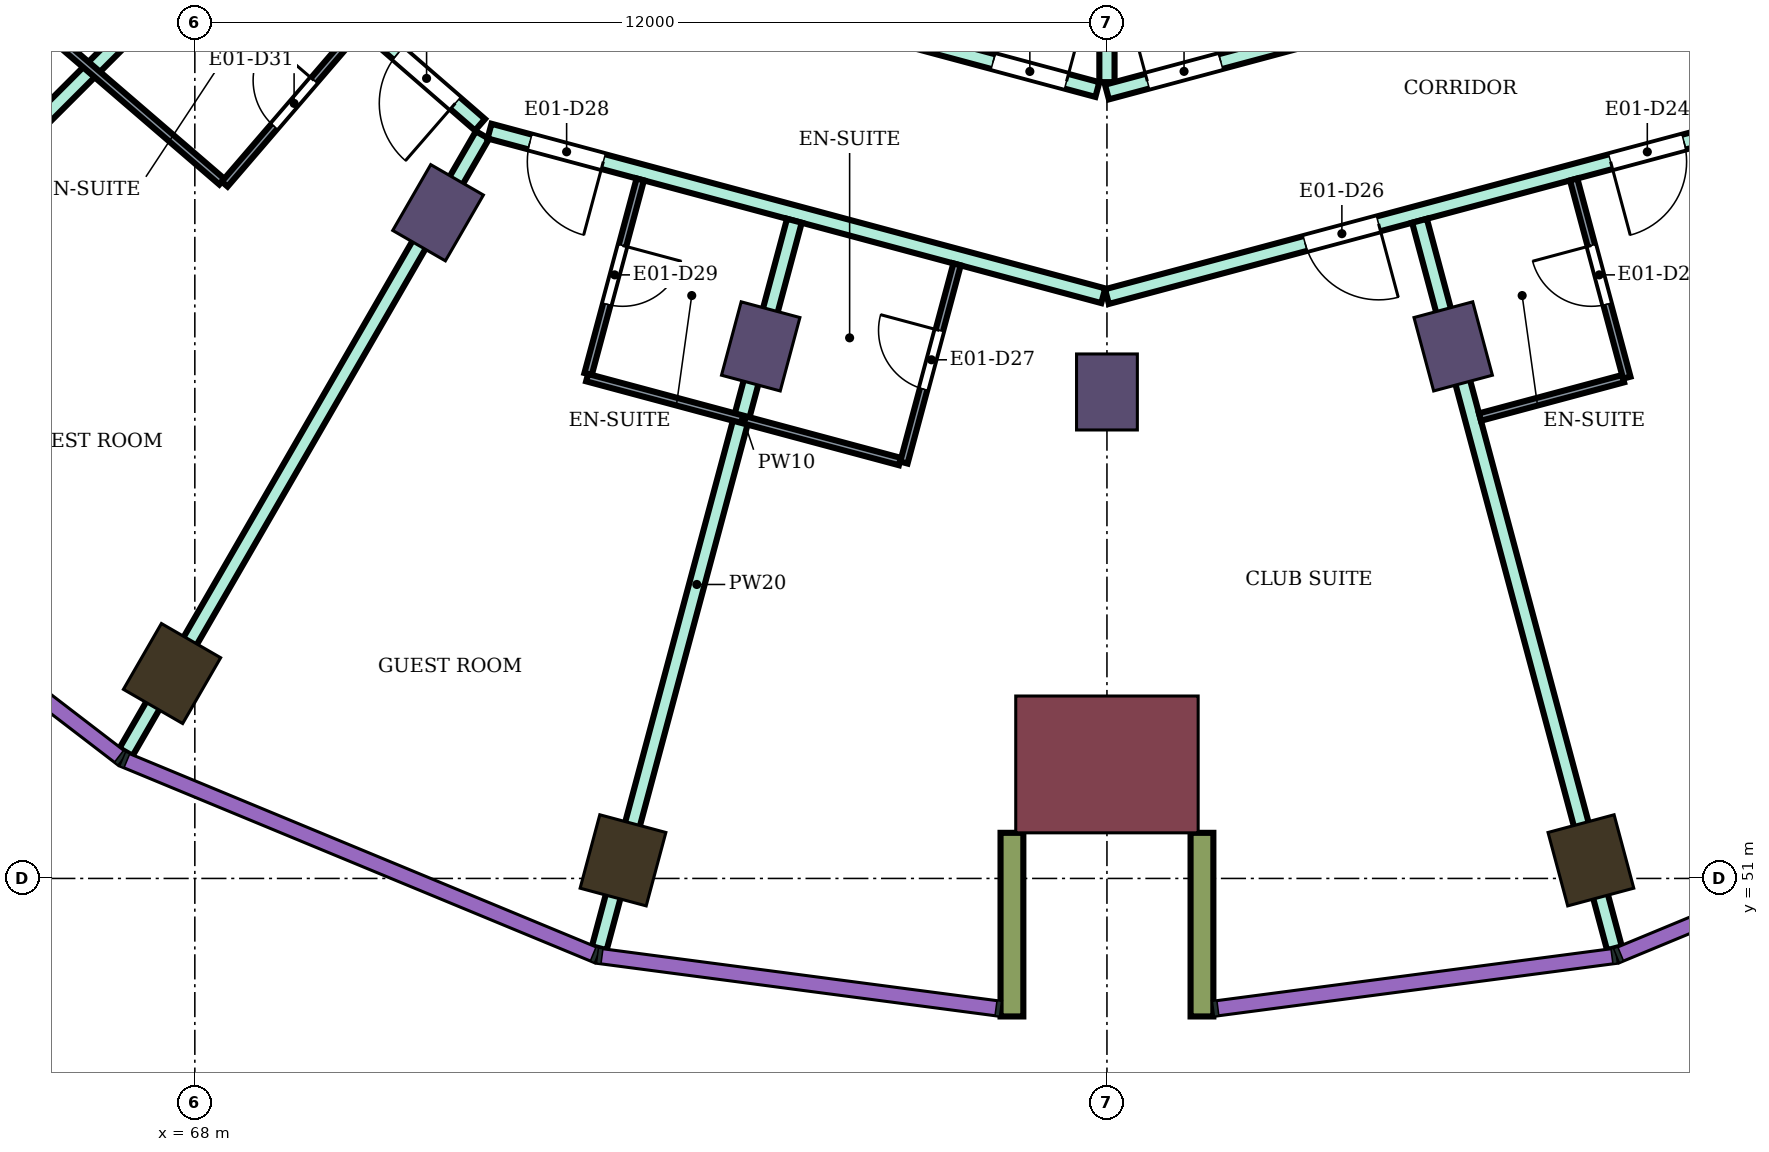
"""IFC4 building model, lengths in metres.
Left out: names, types, materials, properties, quantities, classifications, styles, units other than length and angle.
Written with IfcOpenShell. Run it as: python <this file> out.ifc"""

import sys

from ifc_helpers import new_model, si_unit, direction, frame, frame_2d, origin, origin_2d, place, context, subcontext, project, spatial, rectangle, extrude, element, fill, save


model = new_model("IFC4")
c1 = context("Model", 3, precision=1e-05, world=origin(), true_north=direction((0.0, 1.0)))
c2 = subcontext(c1, "Body", "Model", "MODEL_VIEW")
j1 = project(units=[si_unit("LENGTHUNIT", "METRE"), si_unit("PLANEANGLEUNIT", "RADIAN")], contexts=[c1])
p1 = place(None, origin())
s1 = spatial("IfcSite", under=j1, at=p1, CompositionType="ELEMENT")
p2 = place(p1, origin())
s2 = spatial("IfcBuilding", under=s1, at=p2, CompositionType="ELEMENT")
p3 = place(p2, frame((0.0, 0.0, 118.5)))
s3 = spatial("IfcBuildingStorey", under=s2, at=p3, CompositionType="ELEMENT", Elevation=118.5)
for number, where, z_axis, x_axis in (
    (1, (67.7, 53.696, 0.0), (0.0, 0.0, 1.0), (-0.5, -0.866, 0.0)),
    (2, (73.633, 51.238, 0.0), (0.0, 0.0, 1.0), (-0.259, -0.966, 0.0)),
    (3, (86.367, 51.238, 0.0), (0.0, 0.0, 1.0), (0.259, -0.966, 0.0)),
):
    element("IfcColumn", number, at=place(p3, frame(where, z_axis=z_axis, x_axis=x_axis)), inside=s3, PredefinedType="COLUMN", context=c2, shape_type="SweptSolid", body=[
        extrude(rectangle(XDim=1.0, YDim=0.9, at=origin_2d()), origin(), (0.0, 0.0, 1.0), 3.9),
    ])
for number, where, z_axis, x_axis in (
    (4, (71.2, 59.758, 0.0), (0.0, 0.0, 1.0), (-0.5, -0.866, 0.0)),
    (5, (75.445, 58.0, 0.0), (0.0, 0.0, 1.0), (-0.259, -0.966, 0.0)),
    (6, (80.0, 57.4, 0.0), (0.0, 0.0, 1.0), (0.0, -1.0, 0.0)),
    (7, (84.555, 58.0, 0.0), (0.0, 0.0, 1.0), (0.259, -0.966, 0.0)),
):
    element("IfcColumn", number, at=place(p3, frame(where, z_axis=z_axis, x_axis=x_axis)), inside=s3, PredefinedType="COLUMN", context=c2, shape_type="SweptSolid", body=[
        extrude(rectangle(XDim=1.0, YDim=0.8, at=origin_2d()), origin(), (0.0, 0.0, 1.0), 3.9),
    ])
p4 = place(p3, frame((80.0, 52.5, 0.0), z_axis=(0.0, 0.0, 1.0), x_axis=(0.0, -1.0, 0.0)))
e8 = element("IfcColumn", 8, at=p4, inside=s3, PredefinedType="COLUMN", context=c2, shape_type="SweptSolid", body=[
    extrude(rectangle(XDim=1.8, YDim=2.4, at=origin_2d()), origin(), (0.0, 0.0, 1.0), 3.9),
])
for number, where, z_axis, x_axis in (
    (9, (78.75, 51.6, 0.0), (0.0, 0.0, 1.0), (0.0, -1.0, 0.0)),
    (10, (81.25, 51.6, 0.0), (0.0, 0.0, 1.0), (0.0, -1.0, 0.0)),
):
    element("IfcWall", number, at=place(p3, frame(where, z_axis=z_axis, x_axis=x_axis)), inside=s3, PredefinedType="NOTDEFINED", context=c2, shape_type="SweptSolid", body=[
        extrude(rectangle(XDim=2.416, YDim=0.3, at=frame_2d((1.208, 0.0))), origin(), (0.0, 0.0, 1.0), 3.9),
    ])
p5 = place(p3, frame((63.596, 58.596, 0.0), z_axis=(0.0, 0.0, 1.0), x_axis=(0.707106781187, 0.707106781187, 0.0)))
e11 = element("IfcWall", 11, at=p5, inside=s3, PredefinedType="PARTITIONING", context=c2, shape_type="SweptSolid", body=[
    extrude(rectangle(XDim=7.005, YDim=0.2, at=frame_2d((3.503, 0.0))), origin(), (0.0, 0.0, 1.0), 3.45),
])
p6 = place(p3, frame((67.081, 64.971, 0.0), z_axis=(0.0, 0.0, 1.0), x_axis=(0.755031061605, -0.65568902386, 0.0)))
e12 = element("IfcWall", 12, at=p6, inside=s3, PredefinedType="PARTITIONING", context=c2, shape_type="SweptSolid", body=[
    extrude(rectangle(XDim=6.186, YDim=0.2, at=frame_2d((3.093, 0.0))), origin(), (0.0, 0.0, 1.0), 3.45),
])
p7 = place(p6, frame((4.755, 0.0, 0.0)))
e13 = element("IfcOpeningElement", 13, at=p7, cuts=e12, PredefinedType="OPENING", context=c2, shape_type="SweptSolid", body=[
    extrude(rectangle(XDim=1.0, YDim=2.1, at=frame_2d((0.5, 1.05))), frame((0.0, 0.11, 0.0), z_axis=(0.0, -1.0, 0.0), x_axis=(1.0, 0.0, 0.0)), (0.0, 0.0, 1.0), 0.22),
])
p8 = place(p3, frame((67.094, 52.663, 0.0), z_axis=(0.0, 0.0, 1.0), x_axis=(0.500228134253, 0.865893650342, 0.0)))
e14 = element("IfcWall", 14, at=p8, inside=s3, PredefinedType="PARTITIONING", context=c2, shape_type="SweptSolid", body=[
    extrude(rectangle(XDim=9.375, YDim=0.2, at=frame_2d((4.687, 0.0))), origin(), (0.0, 0.0, 1.0), 3.45),
])
p9 = place(p3, frame((71.877, 60.832, 0.0), z_axis=(0.0, 0.0, 1.0), x_axis=(0.965857276008, -0.259074742848, 0.0)))
e15 = element("IfcWall", 15, at=p9, inside=s3, PredefinedType="PARTITIONING", context=c2, shape_type="SweptSolid", body=[
    extrude(rectangle(XDim=8.36, YDim=0.2, at=frame_2d((4.18, 0.0))), origin(), (0.0, 0.0, 1.0), 3.45),
])
p10 = place(p9, frame((0.55, 0.0, 0.0)))
e16 = element("IfcOpeningElement", 16, at=p10, cuts=e15, PredefinedType="OPENING", context=c2, shape_type="SweptSolid", body=[
    extrude(rectangle(XDim=1.0, YDim=2.1, at=frame_2d((0.5, 1.05))), frame((0.0, 0.11, 0.0), z_axis=(0.0, -1.0, 0.0), x_axis=(1.0, 0.0, 0.0)), (0.0, 0.0, 1.0), 0.22),
])
p11 = place(p3, frame((73.297, 63.143, 0.0), z_axis=(0.0, 0.0, 1.0), x_axis=(0.965859030528, -0.25906820173, 0.0)))
e17 = element("IfcWall", 17, at=p11, inside=s3, PredefinedType="PARTITIONING", context=c2, shape_type="SweptSolid", body=[
    extrude(rectangle(XDim=6.81, YDim=0.2, at=frame_2d((3.405, 0.0))), origin(), (0.0, 0.0, 1.0), 3.45),
])
p12 = place(p11, frame((5.39, 0.0, 0.0)))
e18 = element("IfcOpeningElement", 18, at=p12, cuts=e17, PredefinedType="OPENING", context=c2, shape_type="SweptSolid", body=[
    extrude(rectangle(XDim=1.0, YDim=2.1, at=frame_2d((0.5, 1.05))), frame((0.0, 0.11, 0.0), z_axis=(0.0, -1.0, 0.0), x_axis=(1.0, 0.0, 0.0)), (0.0, 0.0, 1.0), 0.22),
])
p13 = place(p3, frame((73.321, 50.082, 0.0), z_axis=(0.0, 0.0, 1.0), x_axis=(0.259057928998, 0.96586178588, 0.0)))
e19 = element("IfcWall", 19, at=p13, inside=s3, PredefinedType="PARTITIONING", context=c2, shape_type="SweptSolid", body=[
    extrude(rectangle(XDim=9.909, YDim=0.2, at=frame_2d((4.954, 0.0))), origin(), (0.0, 0.0, 1.0), 3.45),
])
p14 = place(p3, frame((80.0, 58.655, 0.0), z_axis=(0.0, 0.0, 1.0), x_axis=(0.965967338894, 0.258664068224, 0.0)))
e20 = element("IfcWall", 20, at=p14, inside=s3, PredefinedType="PARTITIONING", context=c2, shape_type="SweptSolid", body=[
    extrude(rectangle(XDim=8.36, YDim=0.2, at=frame_2d((4.18, 0.0))), origin(), (0.0, 0.0, 1.0), 3.45),
])
p15 = place(p14, frame((6.86, 0.0, 0.0)))
e21 = element("IfcOpeningElement", 21, at=p15, cuts=e20, PredefinedType="OPENING", context=c2, shape_type="SweptSolid", body=[
    extrude(rectangle(XDim=1.0, YDim=2.1, at=frame_2d((0.5, 1.05))), frame((0.0, 0.11, 0.0), z_axis=(0.0, -1.0, 0.0), x_axis=(1.0, 0.0, 0.0)), (0.0, 0.0, 1.0), 0.22),
])
p16 = place(p14, frame((2.7, 0.0, 0.0)))
e22 = element("IfcOpeningElement", 22, at=p16, cuts=e20, PredefinedType="OPENING", context=c2, shape_type="SweptSolid", body=[
    extrude(rectangle(XDim=1.0, YDim=2.1, at=frame_2d((0.5, 1.05))), frame((0.0, 0.11, 0.0), z_axis=(0.0, -1.0, 0.0), x_axis=(1.0, 0.0, 0.0)), (0.0, 0.0, 1.0), 0.22),
])
p17 = place(p3, frame((80.0, 61.476, 0.0), z_axis=(0.0, 0.0, 1.0), x_axis=(0.0, 1.0, 0.0)))
e23 = element("IfcWall", 23, at=p17, inside=s3, PredefinedType="PARTITIONING", context=c2, shape_type="SweptSolid", body=[
    extrude(rectangle(XDim=5.825, YDim=0.2, at=frame_2d((2.913, 0.0))), origin(), (0.0, 0.0, 1.0), 3.45),
])
p18 = place(p3, frame((80.0, 61.346, 0.0), z_axis=(0.0, 0.0, 1.0), x_axis=(0.965924181808, 0.258825182312, 0.0)))
e24 = element("IfcWall", 24, at=p18, inside=s3, PredefinedType="PARTITIONING", context=c2, shape_type="SweptSolid", body=[
    extrude(rectangle(XDim=6.94, YDim=0.2, at=frame_2d((3.47, 0.0))), origin(), (0.0, 0.0, 1.0), 3.45),
])
p19 = place(p18, frame((0.55, 0.0, 0.0)))
e25 = element("IfcOpeningElement", 25, at=p19, cuts=e24, PredefinedType="OPENING", context=c2, shape_type="SweptSolid", body=[
    extrude(rectangle(XDim=1.0, YDim=2.1, at=frame_2d((0.5, 1.05))), frame((0.0, 0.11, 0.0), z_axis=(0.0, -1.0, 0.0), x_axis=(1.0, 0.0, 0.0)), (0.0, 0.0, 1.0), 0.22),
])
p20 = place(p3, frame((84.112, 59.652, 0.0), z_axis=(0.0, 0.0, 1.0), x_axis=(0.258838718107, -0.965920554709, 0.0)))
e26 = element("IfcWall", 26, at=p20, inside=s3, PredefinedType="PARTITIONING", context=c2, shape_type="SweptSolid", body=[
    extrude(rectangle(XDim=9.908, YDim=0.2, at=frame_2d((4.954, 0.0))), origin(), (0.0, 0.0, 1.0), 3.45),
])
p21 = place(p3, frame((65.209, 62.875, 0.0), z_axis=(0.0, 0.0, 1.0), x_axis=(0.757930378138, -0.652335451969, 0.0)))
e27 = element("IfcWall", 27, at=p21, inside=s3, PredefinedType="PARTITIONING", context=c2, shape_type="SweptSolid", body=[
    extrude(rectangle(XDim=4.15, YDim=0.1, at=frame_2d((2.075, 0.0))), origin(), (0.0, 0.0, 1.0), 3.45),
])
p22 = place(p3, frame((68.393, 60.135, 0.0), z_axis=(0.0, 0.0, 1.0), x_axis=(0.652061182569, 0.758166349944, 0.0)))
e28 = element("IfcWall", 28, at=p22, inside=s3, PredefinedType="PARTITIONING", context=c2, shape_type="SweptSolid", body=[
    extrude(rectangle(XDim=2.69, YDim=0.1, at=frame_2d((1.345, 0.0))), origin(), (0.0, 0.0, 1.0), 3.45),
])
p23 = place(p22, frame((1.0, 0.0, 0.0)))
e29 = element("IfcOpeningElement", 29, at=p23, cuts=e28, PredefinedType="OPENING", context=c2, shape_type="SweptSolid", body=[
    extrude(rectangle(XDim=0.8, YDim=2.1, at=frame_2d((0.4, 1.05))), frame((0.0, 0.06, 0.0), z_axis=(0.0, -1.0, 0.0), x_axis=(1.0, 0.0, 0.0)), (0.0, 0.0, 1.0), 0.12),
])
p24 = place(p3, frame((73.174, 57.636, 0.0), z_axis=(0.0, 0.0, 1.0), x_axis=(0.258952498977, 0.96589005755, 0.0)))
e30 = element("IfcWall", 30, at=p24, inside=s3, PredefinedType="PARTITIONING", context=c2, shape_type="SweptSolid", body=[
    extrude(rectangle(XDim=2.65, YDim=0.1, at=frame_2d((1.325, 0.0))), origin(), (0.0, 0.0, 1.0), 3.45),
])
p25 = place(p24, frame((0.95, 0.0, 0.0)))
e31 = element("IfcOpeningElement", 31, at=p25, cuts=e30, PredefinedType="OPENING", context=c2, shape_type="SweptSolid", body=[
    extrude(rectangle(XDim=0.8, YDim=2.1, at=frame_2d((0.4, 1.05))), frame((0.0, 0.06, 0.0), z_axis=(0.0, -1.0, 0.0), x_axis=(1.0, 0.0, 0.0)), (0.0, 0.0, 1.0), 0.12),
])
p26 = place(p3, frame((73.161, 57.588, 0.0), z_axis=(0.0, 0.0, 1.0), x_axis=(0.965858226827, -0.259071198071, 0.0)))
e32 = element("IfcWall", 32, at=p26, inside=s3, PredefinedType="PARTITIONING", context=c2, shape_type="SweptSolid", body=[
    extrude(rectangle(XDim=4.26, YDim=0.1, at=frame_2d((2.13, 0.0))), origin(), (0.0, 0.0, 1.0), 3.45),
])
p27 = place(p3, frame((77.329, 56.471, 0.0), z_axis=(0.0, 0.0, 1.0), x_axis=(0.259013334072, 0.965873745773, 0.0)))
e33 = element("IfcWall", 33, at=p27, inside=s3, PredefinedType="PARTITIONING", context=c2, shape_type="SweptSolid", body=[
    extrude(rectangle(XDim=2.699, YDim=0.1, at=frame_2d((1.35, 0.0))), origin(), (0.0, 0.0, 1.0), 3.45),
])
p28 = place(p27, frame((1.0, 0.0, 0.0)))
e34 = element("IfcOpeningElement", 34, at=p28, cuts=e33, PredefinedType="OPENING", context=c2, shape_type="SweptSolid", body=[
    extrude(rectangle(XDim=0.8, YDim=2.1, at=frame_2d((0.4, 1.05))), frame((0.0, 0.06, 0.0), z_axis=(0.0, -1.0, 0.0), x_axis=(1.0, 0.0, 0.0)), (0.0, 0.0, 1.0), 0.12),
])
p29 = place(p3, frame((84.908, 57.07, 0.0), z_axis=(0.0, 0.0, 1.0), x_axis=(0.965853538138, 0.25908867761, 0.0)))
e35 = element("IfcWall", 35, at=p29, inside=s3, PredefinedType="PARTITIONING", context=c2, shape_type="SweptSolid", body=[
    extrude(rectangle(XDim=1.95, YDim=0.1, at=frame_2d((0.975, 0.0))), origin(), (0.0, 0.0, 1.0), 3.45),
])
p30 = place(p3, frame((86.14, 60.196, 0.0), z_axis=(0.0, 0.0, 1.0), x_axis=(0.258945475746, -0.965891940432, 0.0)))
e36 = element("IfcWall", 36, at=p30, inside=s3, PredefinedType="PARTITIONING", context=c2, shape_type="SweptSolid", body=[
    extrude(rectangle(XDim=2.7, YDim=0.1, at=frame_2d((1.35, 0.0))), origin(), (0.0, 0.0, 1.0), 3.45),
])
p31 = place(p30, frame((0.9, 0.0, 0.0)))
e37 = element("IfcOpeningElement", 37, at=p31, cuts=e36, PredefinedType="OPENING", context=c2, shape_type="SweptSolid", body=[
    extrude(rectangle(XDim=0.8, YDim=2.1, at=frame_2d((0.4, 1.05))), frame((0.0, 0.06, 0.0), z_axis=(0.0, -1.0, 0.0), x_axis=(1.0, 0.0, 0.0)), (0.0, 0.0, 1.0), 0.12),
])
p32 = place(p15, frame((1.0, 0.0, 0.0), z_axis=(0.0, 0.0, 1.0), x_axis=(-1.0, 0.0, 0.0)))
e38 = element("IfcDoor", 38, at=p32, inside=s3, OperationType="SINGLE_SWING_RIGHT", PredefinedType="DOOR", context=c2, shape_type="SweptSolid", body=[
    extrude(rectangle(XDim=1.0, YDim=2.1, at=frame_2d((0.5, 1.05))), frame((0.0, 0.025, 0.0), z_axis=(0.0, -1.0, 0.0), x_axis=(1.0, 0.0, 0.0)), (0.0, 0.0, 1.0), 0.05),
])
fill(e21, e38)
p33 = place(p31, frame((0.8, 0.0, 0.0), z_axis=(0.0, 0.0, 1.0), x_axis=(-1.0, 0.0, 0.0)))
e39 = element("IfcDoor", 39, at=p33, inside=s3, OperationType="SINGLE_SWING_RIGHT", PredefinedType="DOOR", context=c2, shape_type="SweptSolid", body=[
    extrude(rectangle(XDim=0.8, YDim=2.1, at=frame_2d((0.4, 1.05))), frame((0.0, 0.025, 0.0), z_axis=(0.0, -1.0, 0.0), x_axis=(1.0, 0.0, 0.0)), (0.0, 0.0, 1.0), 0.05),
])
fill(e37, e39)
p34 = place(p16, frame((1.0, 0.0, 0.0), z_axis=(0.0, 0.0, 1.0), x_axis=(-1.0, 0.0, 0.0)))
e40 = element("IfcDoor", 40, at=p34, inside=s3, OperationType="SINGLE_SWING_LEFT", PredefinedType="DOOR", context=c2, shape_type="SweptSolid", body=[
    extrude(rectangle(XDim=1.0, YDim=2.1, at=frame_2d((0.5, 1.05))), frame((0.0, 0.025, 0.0), z_axis=(0.0, -1.0, 0.0), x_axis=(1.0, 0.0, 0.0)), (0.0, 0.0, 1.0), 0.05),
])
fill(e22, e40)
p35 = place(p28, origin())
e41 = element("IfcDoor", 41, at=p35, inside=s3, OperationType="SINGLE_SWING_RIGHT", PredefinedType="DOOR", context=c2, shape_type="SweptSolid", body=[
    extrude(rectangle(XDim=0.8, YDim=2.1, at=frame_2d((0.4, 1.05))), frame((0.0, 0.025, 0.0), z_axis=(0.0, -1.0, 0.0), x_axis=(1.0, 0.0, 0.0)), (0.0, 0.0, 1.0), 0.05),
])
fill(e34, e41)
p36 = place(p10, frame((1.0, 0.0, 0.0), z_axis=(0.0, 0.0, 1.0), x_axis=(-1.0, 0.0, 0.0)))
e42 = element("IfcDoor", 42, at=p36, inside=s3, OperationType="SINGLE_SWING_LEFT", PredefinedType="DOOR", context=c2, shape_type="SweptSolid", body=[
    extrude(rectangle(XDim=1.0, YDim=2.1, at=frame_2d((0.5, 1.05))), frame((0.0, 0.025, 0.0), z_axis=(0.0, -1.0, 0.0), x_axis=(1.0, 0.0, 0.0)), (0.0, 0.0, 1.0), 0.05),
])
fill(e16, e42)
p37 = place(p25, frame((0.8, 0.0, 0.0), z_axis=(0.0, 0.0, 1.0), x_axis=(-1.0, 0.0, 0.0)))
e43 = element("IfcDoor", 43, at=p37, inside=s3, OperationType="SINGLE_SWING_LEFT", PredefinedType="DOOR", context=c2, shape_type="SweptSolid", body=[
    extrude(rectangle(XDim=0.8, YDim=2.1, at=frame_2d((0.4, 1.05))), frame((0.0, 0.025, 0.0), z_axis=(0.0, -1.0, 0.0), x_axis=(1.0, 0.0, 0.0)), (0.0, 0.0, 1.0), 0.05),
])
fill(e31, e43)
p38 = place(p7, frame((1.0, 0.0, 0.0), z_axis=(0.0, 0.0, 1.0), x_axis=(-1.0, 0.0, 0.0)))
e44 = element("IfcDoor", 44, at=p38, inside=s3, OperationType="SINGLE_SWING_LEFT", PredefinedType="DOOR", context=c2, shape_type="SweptSolid", body=[
    extrude(rectangle(XDim=1.0, YDim=2.1, at=frame_2d((0.5, 1.05))), frame((0.0, 0.025, 0.0), z_axis=(0.0, -1.0, 0.0), x_axis=(1.0, 0.0, 0.0)), (0.0, 0.0, 1.0), 0.05),
])
fill(e13, e44)
p39 = place(p23, origin())
e45 = element("IfcDoor", 45, at=p39, inside=s3, OperationType="SINGLE_SWING_RIGHT", PredefinedType="DOOR", context=c2, shape_type="SweptSolid", body=[
    extrude(rectangle(XDim=0.8, YDim=2.1, at=frame_2d((0.4, 1.05))), frame((0.0, 0.025, 0.0), z_axis=(0.0, -1.0, 0.0), x_axis=(1.0, 0.0, 0.0)), (0.0, 0.0, 1.0), 0.05),
])
fill(e29, e45)
p40 = place(p19, origin())
e46 = element("IfcDoor", 46, at=p40, inside=s3, OperationType="SINGLE_SWING_LEFT", PredefinedType="DOOR", context=c2, shape_type="SweptSolid", body=[
    extrude(rectangle(XDim=1.0, YDim=2.1, at=frame_2d((0.5, 1.05))), frame((0.0, 0.025, 0.0), z_axis=(0.0, -1.0, 0.0), x_axis=(1.0, 0.0, 0.0)), (0.0, 0.0, 1.0), 0.05),
])
fill(e25, e46)
p41 = place(p12, origin())
e47 = element("IfcDoor", 47, at=p41, inside=s3, OperationType="SINGLE_SWING_RIGHT", PredefinedType="DOOR", context=c2, shape_type="SweptSolid", body=[
    extrude(rectangle(XDim=1.0, YDim=2.1, at=frame_2d((0.5, 1.05))), frame((0.0, 0.025, 0.0), z_axis=(0.0, -1.0, 0.0), x_axis=(1.0, 0.0, 0.0)), (0.0, 0.0, 1.0), 0.05),
])
fill(e18, e47)
save(model, sys.argv[1])
